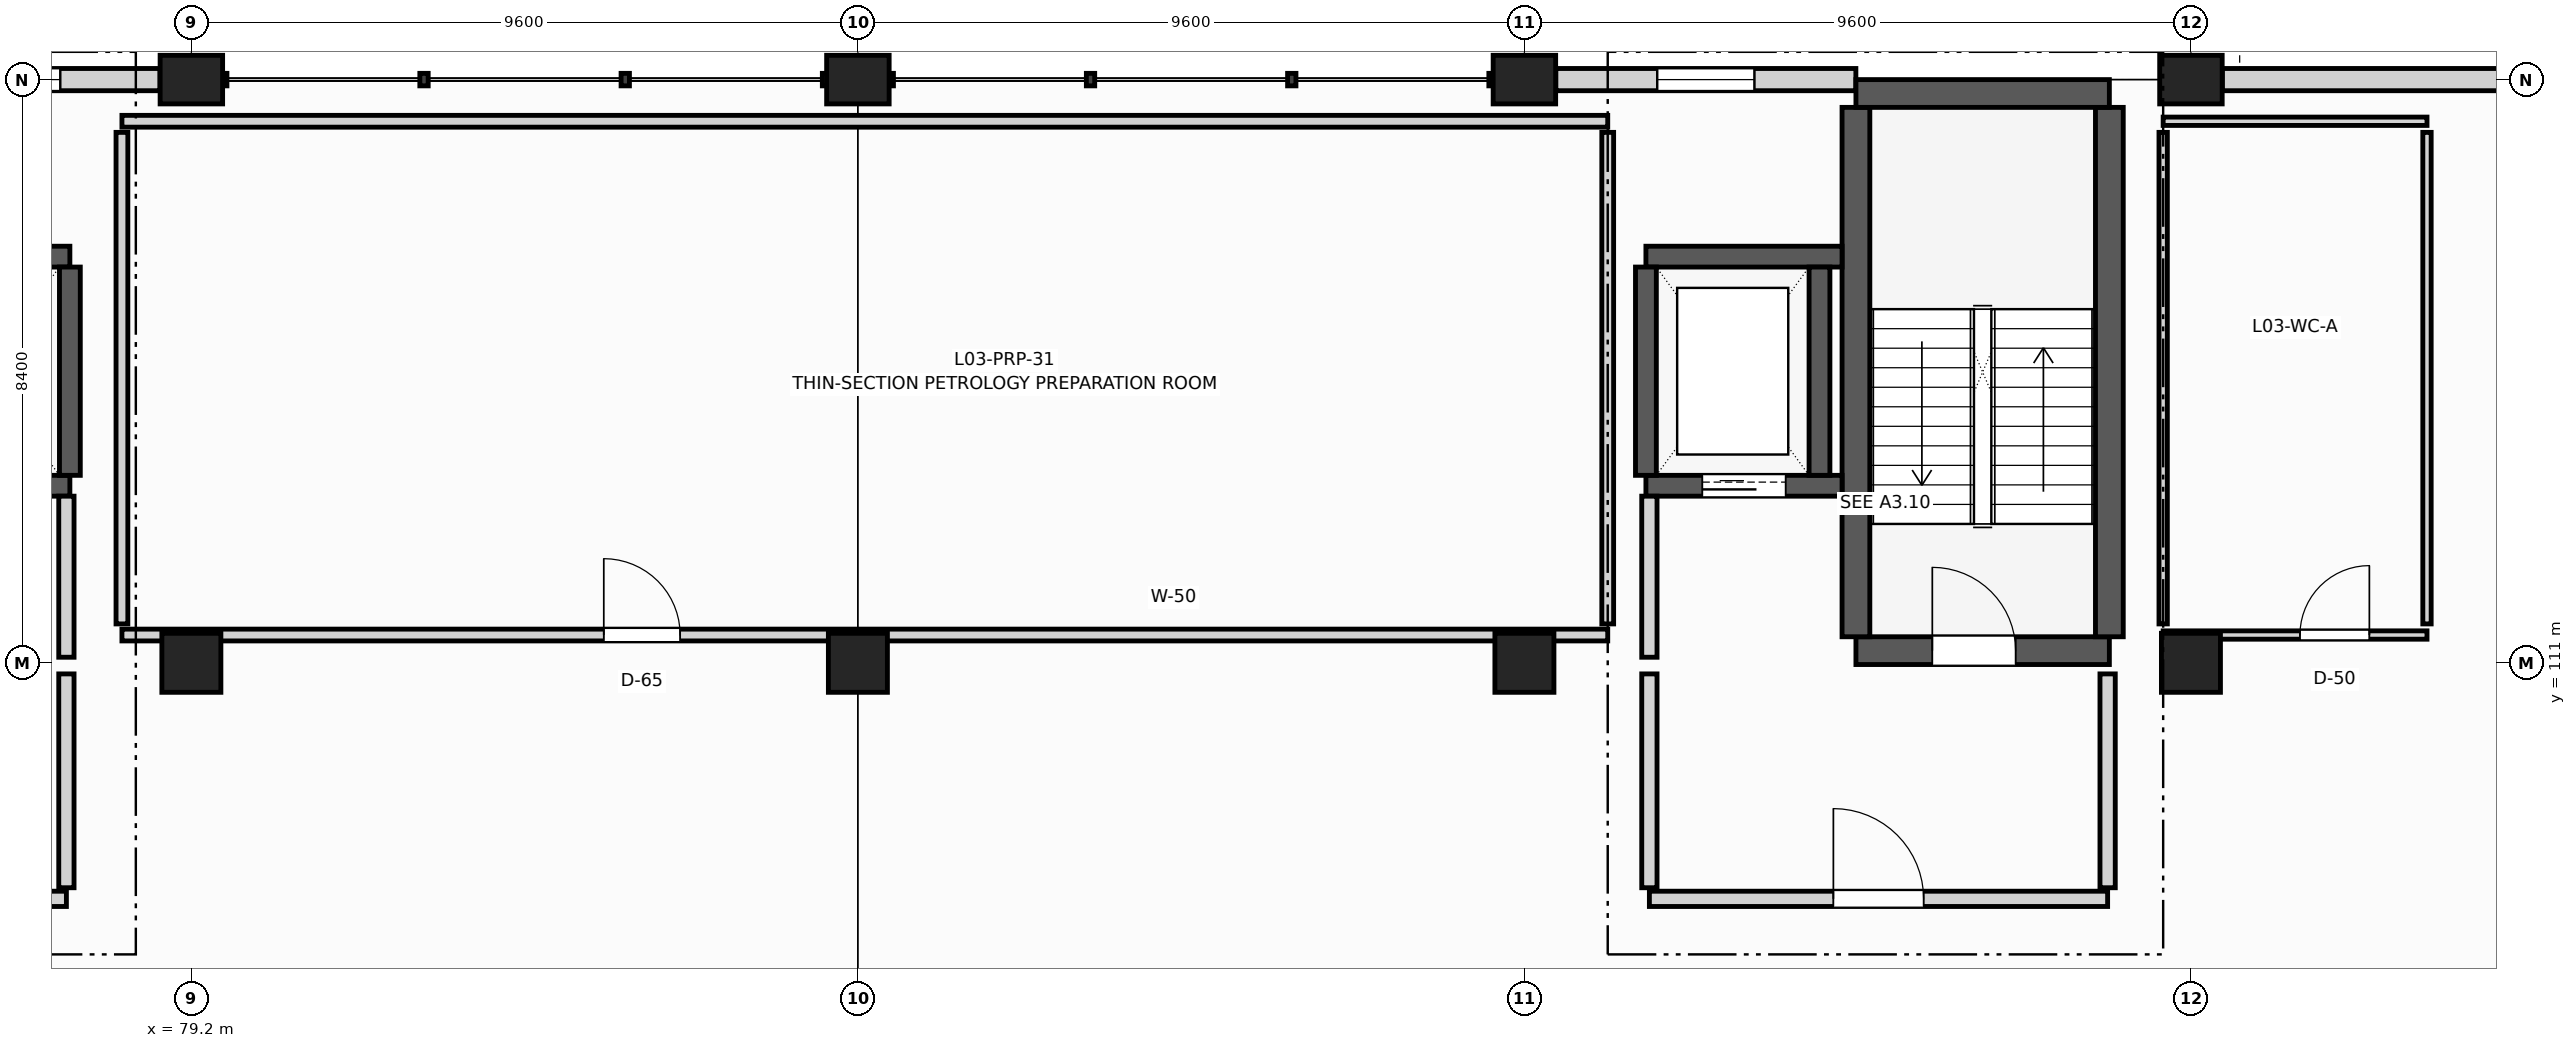
"""IFC4 building model, lengths in metres.
Left out: names, types, materials, properties, quantities, classifications, styles, units other than length and angle.
Written with IfcOpenShell. Run it as: python <this file> out.ifc"""

import sys

from ifc_helpers import new_model, si_unit, direction, frame, frame_2d, origin, origin_2d, place, context, subcontext, project, spatial, rectangle, extrude, element, fill, save


model = new_model("IFC4")
c1 = context("Model", 3, precision=1e-05, world=origin(), true_north=direction((0.0, 1.0)))
c2 = subcontext(c1, "Body", "Model", "MODEL_VIEW")
j1 = project(units=[si_unit("LENGTHUNIT", "METRE"), si_unit("PLANEANGLEUNIT", "RADIAN")], contexts=[c1])
p1 = place(None, origin())
s1 = spatial("IfcSite", under=j1, at=p1, CompositionType="ELEMENT")
p2 = place(p1, origin())
s2 = spatial("IfcBuilding", under=s1, at=p2, CompositionType="ELEMENT")
p3 = place(p2, frame((0.0, 0.0, 14.1)))
s3 = spatial("IfcBuildingStorey", under=s2, at=p3, CompositionType="ELEMENT", Elevation=14.1)
p4 = place(p3, frame((79.2, 111.0, 0.0), z_axis=(0.0, 0.0, 1.0), x_axis=(1.0, 0.0, 0.0)))
e1 = element("IfcColumn", 1, at=p4, inside=s3, PredefinedType="COLUMN", context=c2, shape_type="SweptSolid", body=[
    extrude(rectangle(XDim=0.85, YDim=0.85, at=origin_2d()), origin(), (0.0, 0.0, 1.0), 3.9),
])
p5 = place(p3, frame((79.2, 119.4, 0.0), z_axis=(0.0, 0.0, 1.0), x_axis=(1.0, 0.0, 0.0)))
e2 = element("IfcColumn", 2, at=p5, inside=s3, PredefinedType="COLUMN", context=c2, shape_type="SweptSolid", body=[
    extrude(rectangle(XDim=0.9, YDim=0.7, at=origin_2d()), origin(), (0.0, 0.0, 1.0), 3.9),
])
p6 = place(p3, frame((88.8, 111.0, 0.0), z_axis=(0.0, 0.0, 1.0), x_axis=(1.0, 0.0, 0.0)))
e3 = element("IfcColumn", 3, at=p6, inside=s3, PredefinedType="COLUMN", context=c2, shape_type="SweptSolid", body=[
    extrude(rectangle(XDim=0.85, YDim=0.85, at=origin_2d()), origin(), (0.0, 0.0, 1.0), 3.9),
])
p7 = place(p3, frame((88.8, 119.4, 0.0), z_axis=(0.0, 0.0, 1.0), x_axis=(1.0, 0.0, 0.0)))
e4 = element("IfcColumn", 4, at=p7, inside=s3, PredefinedType="COLUMN", context=c2, shape_type="SweptSolid", body=[
    extrude(rectangle(XDim=0.9, YDim=0.7, at=origin_2d()), origin(), (0.0, 0.0, 1.0), 3.9),
])
p8 = place(p3, frame((98.4, 111.0, 0.0), z_axis=(0.0, 0.0, 1.0), x_axis=(1.0, 0.0, 0.0)))
e5 = element("IfcColumn", 5, at=p8, inside=s3, PredefinedType="COLUMN", context=c2, shape_type="SweptSolid", body=[
    extrude(rectangle(XDim=0.85, YDim=0.85, at=origin_2d()), origin(), (0.0, 0.0, 1.0), 3.9),
])
p9 = place(p3, frame((98.4, 119.4, 0.0), z_axis=(0.0, 0.0, 1.0), x_axis=(1.0, 0.0, 0.0)))
e6 = element("IfcColumn", 6, at=p9, inside=s3, PredefinedType="COLUMN", context=c2, shape_type="SweptSolid", body=[
    extrude(rectangle(XDim=0.9, YDim=0.7, at=origin_2d()), origin(), (0.0, 0.0, 1.0), 3.9),
])
p10 = place(p3, frame((108.0, 111.0, 0.0), z_axis=(0.0, 0.0, 1.0), x_axis=(1.0, 0.0, 0.0)))
e7 = element("IfcColumn", 7, at=p10, inside=s3, PredefinedType="COLUMN", context=c2, shape_type="SweptSolid", body=[
    extrude(rectangle(XDim=0.85, YDim=0.85, at=origin_2d()), origin(), (0.0, 0.0, 1.0), 3.9),
])
p11 = place(p3, frame((108.0, 119.4, 0.0), z_axis=(0.0, 0.0, 1.0), x_axis=(1.0, 0.0, 0.0)))
e8 = element("IfcColumn", 8, at=p11, inside=s3, PredefinedType="COLUMN", context=c2, shape_type="SweptSolid", body=[
    extrude(rectangle(XDim=0.9, YDim=0.7, at=origin_2d()), origin(), (0.0, 0.0, 1.0), 3.9),
])
p12 = place(p3, frame((74.476, 119.4, 0.0), z_axis=(0.0, 0.0, 1.0), x_axis=(1.0, 0.0, 0.0)))
e9 = element("IfcWall", 9, at=p12, inside=s3, PredefinedType="SOLIDWALL", context=c2, shape_type="SweptSolid", body=[
    extrude(rectangle(XDim=4.272, YDim=0.32, at=frame_2d((2.136, 0.0))), origin(), (0.0, 0.0, 1.0), 3.08),
])
p13 = place(p12, frame((1.436, 0.0, 0.9)))
e10 = element("IfcOpeningElement", 10, at=p13, cuts=e9, PredefinedType="OPENING", context=c2, shape_type="SweptSolid", body=[
    extrude(rectangle(XDim=1.4, YDim=1.65, at=frame_2d((0.7, 0.825))), frame((0.0, 0.17, 0.0), z_axis=(0.0, -1.0, 0.0), x_axis=(1.0, 0.0, 0.0)), (0.0, 0.0, 1.0), 0.34),
])
p14 = place(p3, frame((98.852, 119.4, 0.0), z_axis=(0.0, 0.0, 1.0), x_axis=(1.0, 0.0, 0.0)))
e11 = element("IfcWall", 11, at=p14, inside=s3, PredefinedType="SOLIDWALL", context=c2, shape_type="SweptSolid", body=[
    extrude(rectangle(XDim=4.322, YDim=0.32, at=frame_2d((2.161, 0.0))), origin(), (0.0, 0.0, 1.0), 3.08),
])
p15 = place(p14, frame((1.461, 0.0, 0.9)))
e12 = element("IfcOpeningElement", 12, at=p15, cuts=e11, PredefinedType="OPENING", context=c2, shape_type="SweptSolid", body=[
    extrude(rectangle(XDim=1.4, YDim=1.65, at=frame_2d((0.7, 0.825))), frame((0.0, 0.17, 0.0), z_axis=(0.0, -1.0, 0.0), x_axis=(1.0, 0.0, 0.0)), (0.0, 0.0, 1.0), 0.34),
])
p16 = place(p3, frame((108.452, 119.4, 0.0), z_axis=(0.0, 0.0, 1.0), x_axis=(1.0, 0.0, 0.0)))
e13 = element("IfcWall", 13, at=p16, inside=s3, PredefinedType="SOLIDWALL", context=c2, shape_type="SweptSolid", body=[
    extrude(rectangle(XDim=8.696, YDim=0.32, at=frame_2d((4.348, 0.0))), origin(), (0.0, 0.0, 1.0), 3.08),
])
p17 = place(p16, frame((5.448, 0.0, 0.85)))
e14 = element("IfcOpeningElement", 14, at=p17, cuts=e13, PredefinedType="OPENING", context=c2, shape_type="SweptSolid", body=[
    extrude(rectangle(XDim=1.8, YDim=1.9, at=frame_2d((0.9, 0.95))), frame((0.0, 0.17, 0.0), z_axis=(0.0, -1.0, 0.0), x_axis=(1.0, 0.0, 0.0)), (0.0, 0.0, 1.0), 0.34),
])
p18 = place(p3, frame((103.175, 111.175, 0.0), z_axis=(0.0, 0.0, 1.0), x_axis=(1.0, 0.0, 0.0)))
e15 = element("IfcWall", 15, at=p18, inside=s3, PredefinedType="SHEAR", context=c2, shape_type="SweptSolid", body=[
    extrude(rectangle(XDim=3.65, YDim=0.4, at=frame_2d((1.825, 0.0))), origin(), (0.0, 0.0, 1.0), 3.9),
])
p19 = place(p18, frame((1.1, 0.0, 0.0)))
e16 = element("IfcOpeningElement", 16, at=p19, cuts=e15, PredefinedType="OPENING", context=c2, shape_type="SweptSolid", body=[
    extrude(rectangle(XDim=1.2, YDim=2.2, at=frame_2d((0.6, 1.1))), frame((0.0, 0.21, 0.0), z_axis=(0.0, -1.0, 0.0), x_axis=(1.0, 0.0, 0.0)), (0.0, 0.0, 1.0), 0.42),
])
for number, where, z_axis, x_axis in (
    (17, (103.175, 111.375, 0.0), (0.0, 0.0, 1.0), (0.0, 1.0, 0.0)),
    (18, (106.825, 111.375, 0.0), (0.0, 0.0, 1.0), (0.0, 1.0, 0.0)),
):
    element("IfcWall", number, at=place(p3, frame(where, z_axis=z_axis, x_axis=x_axis)), inside=s3, PredefinedType="SHEAR", context=c2, shape_type="SweptSolid", body=[
        extrude(rectangle(XDim=7.625, YDim=0.4, at=frame_2d((3.812, 0.0))), origin(), (0.0, 0.0, 1.0), 3.9),
    ])
p20 = place(p3, frame((103.175, 119.2, 0.0), z_axis=(0.0, 0.0, 1.0), x_axis=(1.0, 0.0, 0.0)))
e19 = element("IfcWall", 19, at=p20, inside=s3, PredefinedType="SHEAR", context=c2, shape_type="SweptSolid", body=[
    extrude(rectangle(XDim=3.65, YDim=0.4, at=frame_2d((1.825, 0.0))), origin(), (0.0, 0.0, 1.0), 3.9),
])
p21 = place(p3, frame((74.7, 113.55, 0.0), z_axis=(0.0, 0.0, 1.0), x_axis=(1.0, 0.0, 0.0)))
e20 = element("IfcWall", 20, at=p21, inside=s3, PredefinedType="SHEAR", context=c2, shape_type="SweptSolid", body=[
    extrude(rectangle(XDim=2.75, YDim=0.3, at=frame_2d((1.375, 0.0))), origin(), (0.0, 0.0, 1.0), 3.9),
])
p22 = place(p21, frame((0.775, 0.0, 0.0)))
e21 = element("IfcOpeningElement", 21, at=p22, cuts=e20, PredefinedType="OPENING", context=c2, shape_type="SweptSolid", body=[
    extrude(rectangle(XDim=1.2, YDim=2.2, at=frame_2d((0.6, 1.1))), frame((0.0, 0.16, 0.0), z_axis=(0.0, -1.0, 0.0), x_axis=(1.0, 0.0, 0.0)), (0.0, 0.0, 1.0), 0.32),
])
p23 = place(p3, frame((74.7, 116.85, 0.0), z_axis=(0.0, 0.0, 1.0), x_axis=(1.0, 0.0, 0.0)))
e22 = element("IfcWall", 22, at=p23, inside=s3, PredefinedType="SHEAR", context=c2, shape_type="SweptSolid", body=[
    extrude(rectangle(XDim=2.75, YDim=0.3, at=frame_2d((1.375, 0.0))), origin(), (0.0, 0.0, 1.0), 3.9),
])
p24 = place(p3, frame((77.45, 113.7, 0.0), z_axis=(0.0, 0.0, 1.0), x_axis=(0.0, 1.0, 0.0)))
e23 = element("IfcWall", 23, at=p24, inside=s3, PredefinedType="SHEAR", context=c2, shape_type="SweptSolid", body=[
    extrude(rectangle(XDim=3.0, YDim=0.3, at=frame_2d((1.5, 0.0))), origin(), (0.0, 0.0, 1.0), 3.9),
])
p25 = place(p3, frame((100.15, 113.55, 0.0), z_axis=(0.0, 0.0, 1.0), x_axis=(1.0, 0.0, 0.0)))
e24 = element("IfcWall", 24, at=p25, inside=s3, PredefinedType="SHEAR", context=c2, shape_type="SweptSolid", body=[
    extrude(rectangle(XDim=2.825, YDim=0.3, at=frame_2d((1.413, 0.0))), origin(), (0.0, 0.0, 1.0), 3.9),
])
p26 = place(p25, frame((0.812, 0.0, 0.0)))
e25 = element("IfcOpeningElement", 25, at=p26, cuts=e24, PredefinedType="OPENING", context=c2, shape_type="SweptSolid", body=[
    extrude(rectangle(XDim=1.2, YDim=2.2, at=frame_2d((0.6, 1.1))), frame((0.0, 0.16, 0.0), z_axis=(0.0, -1.0, 0.0), x_axis=(1.0, 0.0, 0.0)), (0.0, 0.0, 1.0), 0.32),
])
p27 = place(p3, frame((100.15, 116.85, 0.0), z_axis=(0.0, 0.0, 1.0), x_axis=(1.0, 0.0, 0.0)))
e26 = element("IfcWall", 26, at=p27, inside=s3, PredefinedType="SHEAR", context=c2, shape_type="SweptSolid", body=[
    extrude(rectangle(XDim=2.825, YDim=0.3, at=frame_2d((1.413, 0.0))), origin(), (0.0, 0.0, 1.0), 3.9),
])
for number, where, z_axis, x_axis in (
    (27, (100.15, 113.7, 0.0), (0.0, 0.0, 1.0), (0.0, 1.0, 0.0)),
    (28, (102.65, 113.7, 0.0), (0.0, 0.0, 1.0), (0.0, 1.0, 0.0)),
):
    element("IfcWall", number, at=place(p3, frame(where, z_axis=z_axis, x_axis=x_axis)), inside=s3, PredefinedType="SHEAR", context=c2, shape_type="SweptSolid", body=[
        extrude(rectangle(XDim=3.0, YDim=0.3, at=frame_2d((1.5, 0.0))), origin(), (0.0, 0.0, 1.0), 3.9),
    ])
p28 = place(p3, frame((70.8, 107.6, 0.0), z_axis=(0.0, 0.0, 1.0), x_axis=(1.0, 0.0, 0.0)))
e29 = element("IfcWall", 29, at=p28, inside=s3, PredefinedType="PARTITIONING", context=c2, shape_type="SweptSolid", body=[
    extrude(rectangle(XDim=6.6, YDim=0.22, at=frame_2d((3.3, 0.0))), origin(), (0.0, 0.0, 1.0), 3.15),
])
p29 = place(p28, frame((2.65, 0.0, 0.0)))
e30 = element("IfcOpeningElement", 30, at=p29, cuts=e29, PredefinedType="OPENING", context=c2, shape_type="SweptSolid", body=[
    extrude(rectangle(XDim=1.3, YDim=2.2, at=frame_2d((0.65, 1.1))), frame((0.0, 0.12, 0.0), z_axis=(0.0, -1.0, 0.0), x_axis=(1.0, 0.0, 0.0)), (0.0, 0.0, 1.0), 0.24),
])
p30 = place(p3, frame((77.4, 111.08, 0.0), z_axis=(0.0, 0.0, 1.0), x_axis=(0.0, 1.0, 0.0)))
e31 = element("IfcWall", 31, at=p30, inside=s3, PredefinedType="PARTITIONING", context=c2, shape_type="SweptSolid", body=[
    extrude(rectangle(XDim=2.32, YDim=0.22, at=frame_2d((1.16, 0.0))), origin(), (0.0, 0.0, 1.0), 3.15),
])
p31 = place(p3, frame((77.4, 107.76, 0.0), z_axis=(0.0, 0.0, 1.0), x_axis=(0.0, 1.0, 0.0)))
e32 = element("IfcWall", 32, at=p31, inside=s3, PredefinedType="PARTITIONING", context=c2, shape_type="SweptSolid", body=[
    extrude(rectangle(XDim=3.08, YDim=0.22, at=frame_2d((1.54, 0.0))), origin(), (0.0, 0.0, 1.0), 3.15),
])
p32 = place(p3, frame((100.2, 107.6, 0.0), z_axis=(0.0, 0.0, 1.0), x_axis=(1.0, 0.0, 0.0)))
e33 = element("IfcWall", 33, at=p32, inside=s3, PredefinedType="PARTITIONING", context=c2, shape_type="SweptSolid", body=[
    extrude(rectangle(XDim=6.6, YDim=0.22, at=frame_2d((3.3, 0.0))), origin(), (0.0, 0.0, 1.0), 3.15),
])
p33 = place(p32, frame((2.65, 0.0, 0.0)))
e34 = element("IfcOpeningElement", 34, at=p33, cuts=e33, PredefinedType="OPENING", context=c2, shape_type="SweptSolid", body=[
    extrude(rectangle(XDim=1.3, YDim=2.2, at=frame_2d((0.65, 1.1))), frame((0.0, 0.12, 0.0), z_axis=(0.0, -1.0, 0.0), x_axis=(1.0, 0.0, 0.0)), (0.0, 0.0, 1.0), 0.24),
])
p34 = place(p3, frame((100.2, 111.08, 0.0), z_axis=(0.0, 0.0, 1.0), x_axis=(0.0, 1.0, 0.0)))
e35 = element("IfcWall", 35, at=p34, inside=s3, PredefinedType="PARTITIONING", context=c2, shape_type="SweptSolid", body=[
    extrude(rectangle(XDim=2.32, YDim=0.22, at=frame_2d((1.16, 0.0))), origin(), (0.0, 0.0, 1.0), 3.15),
])
for number, where, z_axis, x_axis in (
    (36, (100.2, 107.76, 0.0), (0.0, 0.0, 1.0), (0.0, 1.0, 0.0)),
    (37, (106.8, 107.76, 0.0), (0.0, 0.0, 1.0), (0.0, 1.0, 0.0)),
):
    element("IfcWall", number, at=place(p3, frame(where, z_axis=z_axis, x_axis=x_axis)), inside=s3, PredefinedType="PARTITIONING", context=c2, shape_type="SweptSolid", body=[
        extrude(rectangle(XDim=3.08, YDim=0.22, at=frame_2d((1.54, 0.0))), origin(), (0.0, 0.0, 1.0), 3.15),
    ])
p35 = place(p3, frame((78.2, 111.4, 0.0), z_axis=(0.0, 0.0, 1.0), x_axis=(1.0, 0.0, 0.0)))
e38 = element("IfcWall", 38, at=p35, inside=s3, PredefinedType="PARTITIONING", context=c2, shape_type="SweptSolid", body=[
    extrude(rectangle(XDim=21.4, YDim=0.17, at=frame_2d((10.7, 0.0))), origin(), (0.0, 0.0, 1.0), 3.15),
])
p36 = place(p35, frame((6.94, 0.0, 0.0)))
e39 = element("IfcOpeningElement", 39, at=p36, cuts=e38, PredefinedType="OPENING", context=c2, shape_type="SweptSolid", body=[
    extrude(rectangle(XDim=1.1, YDim=2.2, at=frame_2d((0.55, 1.1))), frame((0.0, 0.095, 0.0), z_axis=(0.0, -1.0, 0.0), x_axis=(1.0, 0.0, 0.0)), (0.0, 0.0, 1.0), 0.19),
])
p37 = place(p3, frame((78.2, 118.8, 0.0), z_axis=(0.0, 0.0, 1.0), x_axis=(1.0, 0.0, 0.0)))
e40 = element("IfcWall", 40, at=p37, inside=s3, PredefinedType="PARTITIONING", context=c2, shape_type="SweptSolid", body=[
    extrude(rectangle(XDim=21.4, YDim=0.17, at=frame_2d((10.7, 0.0))), origin(), (0.0, 0.0, 1.0), 3.15),
])
for number, where, z_axis, x_axis in (
    (41, (78.2, 111.56, 0.0), (0.0, 0.0, 1.0), (0.0, 1.0, 0.0)),
    (42, (99.6, 111.56, 0.0), (0.0, 0.0, 1.0), (0.0, 1.0, 0.0)),
):
    element("IfcWall", number, at=place(p3, frame(where, z_axis=z_axis, x_axis=x_axis)), inside=s3, PredefinedType="PARTITIONING", context=c2, shape_type="SweptSolid", body=[
        extrude(rectangle(XDim=7.08, YDim=0.17, at=frame_2d((3.54, 0.0))), origin(), (0.0, 0.0, 1.0), 3.15),
    ])
p38 = place(p3, frame((107.6, 111.4, 0.0), z_axis=(0.0, 0.0, 1.0), x_axis=(1.0, 0.0, 0.0)))
e43 = element("IfcWall", 43, at=p38, inside=s3, PredefinedType="PARTITIONING", context=c2, shape_type="SweptSolid", body=[
    extrude(rectangle(XDim=3.8, YDim=0.12, at=frame_2d((1.9, 0.0))), origin(), (0.0, 0.0, 1.0), 3.15),
])
p39 = place(p38, frame((1.97, 0.0, 0.0)))
e44 = element("IfcOpeningElement", 44, at=p39, cuts=e43, PredefinedType="OPENING", context=c2, shape_type="SweptSolid", body=[
    extrude(rectangle(XDim=1.0, YDim=2.15, at=frame_2d((0.5, 1.075))), frame((0.0, 0.07, 0.0), z_axis=(0.0, -1.0, 0.0), x_axis=(1.0, 0.0, 0.0)), (0.0, 0.0, 1.0), 0.14),
])
p40 = place(p3, frame((107.6, 118.8, 0.0), z_axis=(0.0, 0.0, 1.0), x_axis=(1.0, 0.0, 0.0)))
e45 = element("IfcWall", 45, at=p40, inside=s3, PredefinedType="PARTITIONING", context=c2, shape_type="SweptSolid", body=[
    extrude(rectangle(XDim=3.8, YDim=0.12, at=frame_2d((1.9, 0.0))), origin(), (0.0, 0.0, 1.0), 3.15),
])
for number, where, z_axis, x_axis in (
    (46, (107.6, 111.56, 0.0), (0.0, 0.0, 1.0), (0.0, 1.0, 0.0)),
    (47, (111.4, 111.56, 0.0), (0.0, 0.0, 1.0), (0.0, 1.0, 0.0)),
):
    element("IfcWall", number, at=place(p3, frame(where, z_axis=z_axis, x_axis=x_axis)), inside=s3, PredefinedType="PARTITIONING", context=c2, shape_type="SweptSolid", body=[
        extrude(rectangle(XDim=7.08, YDim=0.12, at=frame_2d((3.54, 0.0))), origin(), (0.0, 0.0, 1.0), 3.15),
    ])
p41 = place(p13, origin())
e48 = element("IfcWindow", 48, at=p41, inside=s3, PartitioningType="SINGLE_PANEL", PredefinedType="WINDOW", context=c2, shape_type="SweptSolid", body=[
    extrude(rectangle(XDim=1.4, YDim=1.65, at=frame_2d((0.7, 0.825))), frame((0.0, 0.03, 0.0), z_axis=(0.0, -1.0, 0.0), x_axis=(1.0, 0.0, 0.0)), (0.0, 0.0, 1.0), 0.06),
])
fill(e10, e48)
p42 = place(p15, origin())
e49 = element("IfcWindow", 49, at=p42, inside=s3, PartitioningType="SINGLE_PANEL", PredefinedType="WINDOW", context=c2, shape_type="SweptSolid", body=[
    extrude(rectangle(XDim=1.4, YDim=1.65, at=frame_2d((0.7, 0.825))), frame((0.0, 0.03, 0.0), z_axis=(0.0, -1.0, 0.0), x_axis=(1.0, 0.0, 0.0)), (0.0, 0.0, 1.0), 0.06),
])
fill(e12, e49)
p43 = place(p19, origin())
e50 = element("IfcDoor", 50, at=p43, inside=s3, OperationType="SINGLE_SWING_LEFT", PredefinedType="DOOR", context=c2, shape_type="SweptSolid", body=[
    extrude(rectangle(XDim=1.2, YDim=2.2, at=frame_2d((0.6, 1.1))), frame((0.0, 0.025, 0.0), z_axis=(0.0, -1.0, 0.0), x_axis=(1.0, 0.0, 0.0)), (0.0, 0.0, 1.0), 0.05),
])
fill(e16, e50)
p44 = place(p26, origin())
e51 = element("IfcDoor", 51, at=p44, inside=s3, OperationType="SLIDING_TO_LEFT", PredefinedType="DOOR", context=c2, shape_type="SweptSolid", body=[
    extrude(rectangle(XDim=1.2, YDim=2.2, at=frame_2d((0.6, 1.1))), frame((0.0, 0.025, 0.0), z_axis=(0.0, -1.0, 0.0), x_axis=(1.0, 0.0, 0.0)), (0.0, 0.0, 1.0), 0.05),
])
fill(e25, e51)
p45 = place(p33, origin())
e52 = element("IfcDoor", 52, at=p45, inside=s3, OperationType="SINGLE_SWING_LEFT", PredefinedType="DOOR", context=c2, shape_type="SweptSolid", body=[
    extrude(rectangle(XDim=1.3, YDim=2.2, at=frame_2d((0.65, 1.1))), frame((0.0, 0.025, 0.0), z_axis=(0.0, -1.0, 0.0), x_axis=(1.0, 0.0, 0.0)), (0.0, 0.0, 1.0), 0.05),
])
fill(e34, e52)
p46 = place(p36, origin())
e53 = element("IfcDoor", 53, at=p46, inside=s3, OperationType="SINGLE_SWING_LEFT", PredefinedType="DOOR", context=c2, shape_type="SweptSolid", body=[
    extrude(rectangle(XDim=1.1, YDim=2.2, at=frame_2d((0.55, 1.1))), frame((0.0, 0.025, 0.0), z_axis=(0.0, -1.0, 0.0), x_axis=(1.0, 0.0, 0.0)), (0.0, 0.0, 1.0), 0.05),
])
fill(e39, e53)
p47 = place(p39, origin())
e54 = element("IfcDoor", 54, at=p47, inside=s3, OperationType="SINGLE_SWING_RIGHT", PredefinedType="DOOR", context=c2, shape_type="SweptSolid", body=[
    extrude(rectangle(XDim=1.0, YDim=2.15, at=frame_2d((0.5, 1.075))), frame((0.0, 0.025, 0.0), z_axis=(0.0, -1.0, 0.0), x_axis=(1.0, 0.0, 0.0)), (0.0, 0.0, 1.0), 0.05),
])
fill(e44, e54)
save(model, sys.argv[1])
